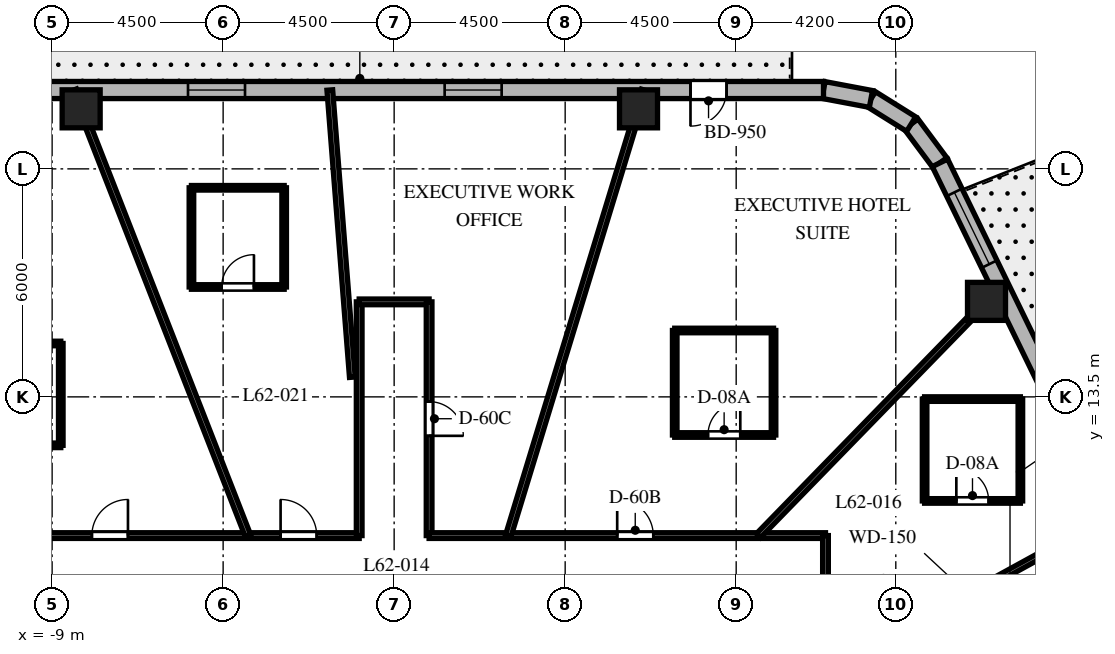
"""IFC4 building model, lengths in metres.
Left out: names, types, materials, properties, quantities, classifications, styles, units other than length and angle.
Written with IfcOpenShell. Run it as: python <this file> out.ifc"""

import sys

from ifc_helpers import new_model, si_unit, direction, frame, frame_2d, origin, origin_2d, place, context, subcontext, project, spatial, rectangle, extrude, element, fill, save


model = new_model("IFC4")
c1 = context("Model", 3, precision=1e-05, world=origin(), true_north=direction((0.0, 1.0)))
c2 = subcontext(c1, "Body", "Model", "MODEL_VIEW")
j1 = project(units=[si_unit("LENGTHUNIT", "METRE"), si_unit("PLANEANGLEUNIT", "RADIAN")], contexts=[c1])
p1 = place(None, origin())
s1 = spatial("IfcSite", under=j1, at=p1, CompositionType="ELEMENT")
p2 = place(p1, origin())
s2 = spatial("IfcBuilding", under=s1, at=p2, CompositionType="ELEMENT")
p3 = place(p2, frame((0.0, 0.0, 248.3)))
s3 = spatial("IfcBuildingStorey", under=s2, at=p3, CompositionType="ELEMENT", Elevation=248.3)
for number, where, z_axis, x_axis in (
    (1, (15.587, 16.013, 0.0), (0.0, 0.0, 1.0), (1.0, 0.0, 0.0)),
    (2, (6.43, 21.08, 0.0), (0.0, 0.0, 1.0), (1.0, 0.0, 0.0)),
    (3, (-8.236, 21.08, 0.0), (0.0, 0.0, 1.0), (1.0, 0.0, 0.0)),
):
    element("IfcColumn", number, at=place(p3, frame(where, z_axis=z_axis, x_axis=x_axis)), inside=s3, PredefinedType="COLUMN", context=c2, shape_type="SweptSolid", body=[
        extrude(rectangle(XDim=1.0, YDim=1.0, at=origin_2d()), origin(), (0.0, 0.0, 1.0), 3.8),
    ])
p4 = place(p3, frame((14.362, 19.658, 0.0), z_axis=(0.0, 0.0, 1.0), x_axis=(-0.596642462792, 0.80250717853, 0.0)))
e4 = element("IfcWall", 4, at=p4, inside=s3, PredefinedType="SOLIDWALL", context=c2, shape_type="SweptSolid", body=[
    extrude(rectangle(XDim=1.27, YDim=0.45, at=frame_2d((0.635, 0.0))), origin(), (0.0, 0.0, 1.0), 3.5),
])
p5 = place(p3, frame((13.604, 20.678, 0.0), z_axis=(0.0, 0.0, 1.0), x_axis=(-0.847910404124, 0.53013955387, 0.0)))
e5 = element("IfcWall", 5, at=p5, inside=s3, PredefinedType="SOLIDWALL", context=c2, shape_type="SweptSolid", body=[
    extrude(rectangle(XDim=1.249, YDim=0.45, at=frame_2d((0.624, 0.0))), origin(), (0.0, 0.0, 1.0), 3.5),
])
p6 = place(p3, frame((12.546, 21.34, 0.0), z_axis=(0.0, 0.0, 1.0), x_axis=(-0.982686750835, 0.18527479519, 0.0)))
e6 = element("IfcWall", 6, at=p6, inside=s3, PredefinedType="SOLIDWALL", context=c2, shape_type="SweptSolid", body=[
    extrude(rectangle(XDim=1.27, YDim=0.45, at=frame_2d((0.635, 0.0))), origin(), (0.0, 0.0, 1.0), 3.5),
])
p7 = place(p3, frame((22.74, 2.452, 0.0), z_axis=(0.0, 0.0, 1.0), x_axis=(-0.437753424814, 0.899095066755, 0.0)))
e7 = element("IfcWall", 7, at=p7, inside=s3, PredefinedType="SOLIDWALL", context=c2, shape_type="SweptSolid", body=[
    extrude(rectangle(XDim=19.137, YDim=0.45, at=frame_2d((9.569, 0.0))), origin(), (0.0, 0.0, 1.0), 3.5),
])
p8 = place(p7, frame((4.763, 0.0, 0.0)))
e8 = element("IfcOpeningElement", 8, at=p8, cuts=e7, PredefinedType="OPENING", context=c2, shape_type="SweptSolid", body=[
    extrude(rectangle(XDim=1.0, YDim=2.15, at=frame_2d((0.5, 1.075))), frame((0.0, 0.235, 0.0), z_axis=(0.0, -1.0, 0.0), x_axis=(1.0, 0.0, 0.0)), (0.0, 0.0, 1.0), 0.47),
])
p9 = place(p7, frame((6.611, 0.0, 0.8)))
e9 = element("IfcOpeningElement", 9, at=p9, cuts=e7, PredefinedType="OPENING", context=c2, shape_type="SweptSolid", body=[
    extrude(rectangle(XDim=1.2, YDim=1.8, at=frame_2d((0.6, 0.9))), frame((0.0, 0.235, 0.0), z_axis=(0.0, -1.0, 0.0), x_axis=(1.0, 0.0, 0.0)), (0.0, 0.0, 1.0), 0.47),
])
p10 = place(p7, frame((10.856, 0.0, 0.8)))
e10 = element("IfcOpeningElement", 10, at=p10, cuts=e7, PredefinedType="OPENING", context=c2, shape_type="SweptSolid", body=[
    extrude(rectangle(XDim=2.1, YDim=1.85, at=frame_2d((1.05, 0.925))), frame((0.0, 0.235, 0.0), z_axis=(0.0, -1.0, 0.0), x_axis=(1.0, 0.0, 0.0)), (0.0, 0.0, 1.0), 0.47),
])
p11 = place(p7, frame((16.173, 0.0, 0.8)))
e11 = element("IfcOpeningElement", 11, at=p11, cuts=e7, PredefinedType="OPENING", context=c2, shape_type="SweptSolid", body=[
    extrude(rectangle(XDim=2.1, YDim=1.85, at=frame_2d((1.05, 0.925))), frame((0.0, 0.235, 0.0), z_axis=(0.0, -1.0, 0.0), x_axis=(1.0, 0.0, 0.0)), (0.0, 0.0, 1.0), 0.47),
])
p12 = place(p7, frame((0.916, 0.0, 0.8)))
e12 = element("IfcOpeningElement", 12, at=p12, cuts=e7, PredefinedType="OPENING", context=c2, shape_type="SweptSolid", body=[
    extrude(rectangle(XDim=2.1, YDim=1.85, at=frame_2d((1.05, 0.925))), frame((0.0, 0.235, 0.0), z_axis=(0.0, -1.0, 0.0), x_axis=(1.0, 0.0, 0.0)), (0.0, 0.0, 1.0), 0.47),
])
p13 = place(p3, frame((11.298, 21.575, 0.0), z_axis=(0.0, 0.0, 1.0), x_axis=(-1.0, 0.0, 0.0)))
e13 = element("IfcWall", 13, at=p13, inside=s3, PredefinedType="SOLIDWALL", context=c2, shape_type="SweptSolid", body=[
    extrude(rectangle(XDim=24.399, YDim=0.45, at=frame_2d((12.2, 0.0))), origin(), (0.0, 0.0, 1.0), 3.5),
])
p14 = place(p13, frame((2.55, 0.0, 0.0)))
e14 = element("IfcOpeningElement", 14, at=p14, cuts=e13, PredefinedType="OPENING", context=c2, shape_type="SweptSolid", body=[
    extrude(rectangle(XDim=0.95, YDim=2.15, at=frame_2d((0.475, 1.075))), frame((0.0, 0.235, 0.0), z_axis=(0.0, -1.0, 0.0), x_axis=(1.0, 0.0, 0.0)), (0.0, 0.0, 1.0), 0.47),
])
p15 = place(p13, frame((8.469, 0.0, 0.8)))
e15 = element("IfcOpeningElement", 15, at=p15, cuts=e13, PredefinedType="OPENING", context=c2, shape_type="SweptSolid", body=[
    extrude(rectangle(XDim=1.5, YDim=1.8, at=frame_2d((0.75, 0.9))), frame((0.0, 0.235, 0.0), z_axis=(0.0, -1.0, 0.0), x_axis=(1.0, 0.0, 0.0)), (0.0, 0.0, 1.0), 0.47),
])
p16 = place(p13, frame((15.222, 0.0, 0.8)))
e16 = element("IfcOpeningElement", 16, at=p16, cuts=e13, PredefinedType="OPENING", context=c2, shape_type="SweptSolid", body=[
    extrude(rectangle(XDim=1.5, YDim=1.8, at=frame_2d((0.75, 0.9))), frame((0.0, 0.235, 0.0), z_axis=(0.0, -1.0, 0.0), x_axis=(1.0, 0.0, 0.0)), (0.0, 0.0, 1.0), 0.47),
])
p17 = place(p13, frame((21.296, 0.0, 0.8)))
e17 = element("IfcOpeningElement", 17, at=p17, cuts=e13, PredefinedType="OPENING", context=c2, shape_type="SweptSolid", body=[
    extrude(rectangle(XDim=1.5, YDim=1.8, at=frame_2d((0.75, 0.9))), frame((0.0, 0.235, 0.0), z_axis=(0.0, -1.0, 0.0), x_axis=(1.0, 0.0, 0.0)), (0.0, 0.0, 1.0), 0.47),
])
p18 = place(p3, frame((-11.35, 9.85, 0.0), z_axis=(0.0, 0.0, 1.0), x_axis=(1.0, 0.0, 0.0)))
e18 = element("IfcWall", 18, at=p18, inside=s3, PredefinedType="PARTITIONING", context=c2, shape_type="SweptSolid", body=[
    extrude(rectangle(XDim=10.43, YDim=0.15, at=frame_2d((5.215, 0.0))), origin(), (0.0, 0.0, 1.0), 2.99),
])
p19 = place(p18, frame((8.362, 0.0, 0.0)))
e19 = element("IfcOpeningElement", 19, at=p19, cuts=e18, PredefinedType="OPENING", context=c2, shape_type="SweptSolid", body=[
    extrude(rectangle(XDim=0.95, YDim=2.03, at=frame_2d((0.475, 1.015))), frame((0.0, 0.085, 0.0), z_axis=(0.0, -1.0, 0.0), x_axis=(1.0, 0.0, 0.0)), (0.0, 0.0, 1.0), 0.17),
])
p20 = place(p18, frame((3.396, 0.0, 0.0)))
e20 = element("IfcOpeningElement", 20, at=p20, cuts=e18, PredefinedType="OPENING", context=c2, shape_type="SweptSolid", body=[
    extrude(rectangle(XDim=0.95, YDim=2.03, at=frame_2d((0.475, 1.015))), frame((0.0, 0.085, 0.0), z_axis=(0.0, -1.0, 0.0), x_axis=(1.0, 0.0, 0.0)), (0.0, 0.0, 1.0), 0.17),
])
p21 = place(p3, frame((-0.92, 9.85, 0.0), z_axis=(0.0, 0.0, 1.0), x_axis=(0.0, 1.0, 0.0)))
e21 = element("IfcWall", 21, at=p21, inside=s3, PredefinedType="PARTITIONING", context=c2, shape_type="SweptSolid", body=[
    extrude(rectangle(XDim=6.15, YDim=0.15, at=frame_2d((3.075, 0.0))), origin(), (0.0, 0.0, 1.0), 3.026),
])
p22 = place(p3, frame((-0.92, 16.0, 0.0), z_axis=(0.0, 0.0, 1.0), x_axis=(1.0, 0.0, 0.0)))
e22 = element("IfcWall", 22, at=p22, inside=s3, PredefinedType="PARTITIONING", context=c2, shape_type="SweptSolid", body=[
    extrude(rectangle(XDim=1.84, YDim=0.15, at=frame_2d((0.92, 0.0))), origin(), (0.0, 0.0, 1.0), 3.5),
])
p23 = place(p3, frame((0.92, 16.0, 0.0), z_axis=(0.0, 0.0, 1.0), x_axis=(0.0, -1.0, 0.0)))
e23 = element("IfcWall", 23, at=p23, inside=s3, PredefinedType="PARTITIONING", context=c2, shape_type="SweptSolid", body=[
    extrude(rectangle(XDim=6.15, YDim=0.15, at=frame_2d((3.075, 0.0))), origin(), (0.0, 0.0, 1.0), 3.026),
])
p24 = place(p23, frame((2.625, 0.0, 0.0)))
e24 = element("IfcOpeningElement", 24, at=p24, cuts=e23, PredefinedType="OPENING", context=c2, shape_type="SweptSolid", body=[
    extrude(rectangle(XDim=0.9, YDim=2.03, at=frame_2d((0.45, 1.015))), frame((0.0, 0.085, 0.0), z_axis=(0.0, -1.0, 0.0), x_axis=(1.0, 0.0, 0.0)), (0.0, 0.0, 1.0), 0.17),
])
p25 = place(p3, frame((0.92, 9.85, 0.0), z_axis=(0.0, 0.0, 1.0), x_axis=(1.0, 0.0, 0.0)))
e25 = element("IfcWall", 25, at=p25, inside=s3, PredefinedType="PARTITIONING", context=c2, shape_type="SweptSolid", body=[
    extrude(rectangle(XDim=10.43, YDim=0.15, at=frame_2d((5.215, 0.0))), origin(), (0.0, 0.0, 1.0), 2.99),
])
p26 = place(p25, frame((4.949, 0.0, 0.0)))
e26 = element("IfcOpeningElement", 26, at=p26, cuts=e25, PredefinedType="OPENING", context=c2, shape_type="SweptSolid", body=[
    extrude(rectangle(XDim=0.95, YDim=2.03, at=frame_2d((0.475, 1.015))), frame((0.0, 0.085, 0.0), z_axis=(0.0, -1.0, 0.0), x_axis=(1.0, 0.0, 0.0)), (0.0, 0.0, 1.0), 0.17),
])
p27 = place(p3, frame((11.35, 9.85, 0.0), z_axis=(0.0, 0.0, 1.0), x_axis=(0.0, -1.0, 0.0)))
e27 = element("IfcWall", 27, at=p27, inside=s3, PredefinedType="PARTITIONING", context=c2, shape_type="SweptSolid", body=[
    extrude(rectangle(XDim=12.4, YDim=0.15, at=frame_2d((6.2, 0.0))), origin(), (0.0, 0.0, 1.0), 2.99),
])
p28 = place(p27, frame((4.709, 0.0, 0.0)))
e28 = element("IfcOpeningElement", 28, at=p28, cuts=e27, PredefinedType="OPENING", context=c2, shape_type="SweptSolid", body=[
    extrude(rectangle(XDim=0.9, YDim=2.03, at=frame_2d((0.45, 1.015))), frame((0.0, 0.085, 0.0), z_axis=(0.0, -1.0, 0.0), x_axis=(1.0, 0.0, 0.0)), (0.0, 0.0, 1.0), 0.17),
])
p29 = place(p27, frame((1.457, 0.0, 0.0)))
e29 = element("IfcOpeningElement", 29, at=p29, cuts=e27, PredefinedType="OPENING", context=c2, shape_type="SweptSolid", body=[
    extrude(rectangle(XDim=0.95, YDim=2.03, at=frame_2d((0.475, 1.015))), frame((0.0, 0.085, 0.0), z_axis=(0.0, -1.0, 0.0), x_axis=(1.0, 0.0, 0.0)), (0.0, 0.0, 1.0), 0.17),
])
p30 = place(p27, frame((8.835, 0.0, 0.0)))
e30 = element("IfcOpeningElement", 30, at=p30, cuts=e27, PredefinedType="OPENING", context=c2, shape_type="SweptSolid", body=[
    extrude(rectangle(XDim=0.95, YDim=2.03, at=frame_2d((0.475, 1.015))), frame((0.0, 0.085, 0.0), z_axis=(0.0, -1.0, 0.0), x_axis=(1.0, 0.0, 0.0)), (0.0, 0.0, 1.0), 0.17),
])
p31 = place(p3, frame((11.35, 6.227, 0.0), z_axis=(0.0, 0.0, 1.0), x_axis=(0.876723190824, 0.480995266786, 0.0)))
e31 = element("IfcWall", 31, at=p31, inside=s3, PredefinedType="PARTITIONING", context=c2, shape_type="SweptSolid", body=[
    extrude(rectangle(XDim=8.598, YDim=0.15, at=frame_2d((4.299, 0.0))), origin(), (0.0, 0.0, 1.0), 2.74),
])
p32 = place(p3, frame((9.588, 9.85, 0.0), z_axis=(0.0, 0.0, 1.0), x_axis=(0.697519469595, 0.716565830567, 0.0)))
e32 = element("IfcWall", 32, at=p32, inside=s3, PredefinedType="PARTITIONING", context=c2, shape_type="SweptSolid", body=[
    extrude(rectangle(XDim=9.126, YDim=0.15, at=frame_2d((4.563, 0.0))), origin(), (0.0, 0.0, 1.0), 2.74),
])
p33 = place(p3, frame((3.004, 9.85, 0.0), z_axis=(0.0, 0.0, 1.0), x_axis=(0.291775760688, 0.956486751333, 0.0)))
e33 = element("IfcWall", 33, at=p33, inside=s3, PredefinedType="PARTITIONING", context=c2, shape_type="SweptSolid", body=[
    extrude(rectangle(XDim=12.258, YDim=0.15, at=frame_2d((6.129, 0.0))), origin(), (0.0, 0.0, 1.0), 2.74),
])
p34 = place(p3, frame((-1.1, 14.018, 0.0), z_axis=(0.0, 0.0, 1.0), x_axis=(-0.078228275349, 0.996935472804, 0.0)))
e34 = element("IfcWall", 34, at=p34, inside=s3, PredefinedType="PARTITIONING", context=c2, shape_type="SweptSolid", body=[
    extrude(rectangle(XDim=7.581, YDim=0.15, at=frame_2d((3.79, 0.0))), origin(), (0.0, 0.0, 1.0), 2.74),
])
p35 = place(p3, frame((-3.848, 9.85, 0.0), z_axis=(0.0, 0.0, 1.0), x_axis=(-0.363921778212, 0.931429513889, 0.0)))
e35 = element("IfcWall", 35, at=p35, inside=s3, PredefinedType="PARTITIONING", context=c2, shape_type="SweptSolid", body=[
    extrude(rectangle(XDim=12.588, YDim=0.15, at=frame_2d((6.294, 0.0))), origin(), (0.0, 0.0, 1.0), 2.74),
])
p36 = place(p3, frame((13.958, 10.762, 0.0), z_axis=(0.0, 0.0, 1.0), x_axis=(1.0, 0.0, 0.0)))
e36 = element("IfcWall", 36, at=p36, inside=s3, PredefinedType="PARTITIONING", context=c2, shape_type="SweptSolid", body=[
    extrude(rectangle(XDim=2.52, YDim=0.12, at=frame_2d((1.26, 0.0))), origin(), (0.0, 0.0, 1.0), 3.026),
])
p37 = place(p36, frame((0.835, 0.0, 0.0)))
e37 = element("IfcOpeningElement", 37, at=p37, cuts=e36, PredefinedType="OPENING", context=c2, shape_type="SweptSolid", body=[
    extrude(rectangle(XDim=0.85, YDim=2.03, at=frame_2d((0.425, 1.015))), frame((0.0, 0.07, 0.0), z_axis=(0.0, -1.0, 0.0), x_axis=(1.0, 0.0, 0.0)), (0.0, 0.0, 1.0), 0.14),
])
p38 = place(p3, frame((16.478, 10.762, 0.0), z_axis=(0.0, 0.0, 1.0), x_axis=(0.0, 1.0, 0.0)))
e38 = element("IfcWall", 38, at=p38, inside=s3, PredefinedType="PARTITIONING", context=c2, shape_type="SweptSolid", body=[
    extrude(rectangle(XDim=2.68, YDim=0.12, at=frame_2d((1.34, 0.0))), origin(), (0.0, 0.0, 1.0), 3.5),
])
p39 = place(p3, frame((16.478, 13.442, 0.0), z_axis=(0.0, 0.0, 1.0), x_axis=(-1.0, 0.0, 0.0)))
e39 = element("IfcWall", 39, at=p39, inside=s3, PredefinedType="PARTITIONING", context=c2, shape_type="SweptSolid", body=[
    extrude(rectangle(XDim=2.52, YDim=0.12, at=frame_2d((1.26, 0.0))), origin(), (0.0, 0.0, 1.0), 3.5),
])
p40 = place(p3, frame((13.958, 13.442, 0.0), z_axis=(0.0, 0.0, 1.0), x_axis=(0.0, -1.0, 0.0)))
e40 = element("IfcWall", 40, at=p40, inside=s3, PredefinedType="PARTITIONING", context=c2, shape_type="SweptSolid", body=[
    extrude(rectangle(XDim=2.68, YDim=0.12, at=frame_2d((1.34, 0.0))), origin(), (0.0, 0.0, 1.0), 3.026),
])
p41 = place(p3, frame((7.383, 12.497, 0.0), z_axis=(0.0, 0.0, 1.0), x_axis=(1.0, 0.0, 0.0)))
e41 = element("IfcWall", 41, at=p41, inside=s3, PredefinedType="PARTITIONING", context=c2, shape_type="SweptSolid", body=[
    extrude(rectangle(XDim=2.6, YDim=0.12, at=frame_2d((1.3, 0.0))), origin(), (0.0, 0.0, 1.0), 2.94),
])
p42 = place(p41, frame((0.875, 0.0, 0.0)))
e42 = element("IfcOpeningElement", 42, at=p42, cuts=e41, PredefinedType="OPENING", context=c2, shape_type="SweptSolid", body=[
    extrude(rectangle(XDim=0.85, YDim=2.03, at=frame_2d((0.425, 1.015))), frame((0.0, 0.07, 0.0), z_axis=(0.0, -1.0, 0.0), x_axis=(1.0, 0.0, 0.0)), (0.0, 0.0, 1.0), 0.14),
])
p43 = place(p3, frame((9.983, 12.497, 0.0), z_axis=(0.0, 0.0, 1.0), x_axis=(0.0, 1.0, 0.0)))
e43 = element("IfcWall", 43, at=p43, inside=s3, PredefinedType="PARTITIONING", context=c2, shape_type="SweptSolid", body=[
    extrude(rectangle(XDim=2.75, YDim=0.12, at=frame_2d((1.375, 0.0))), origin(), (0.0, 0.0, 1.0), 3.072),
])
p44 = place(p3, frame((9.983, 15.247, 0.0), z_axis=(0.0, 0.0, 1.0), x_axis=(-1.0, 0.0, 0.0)))
e44 = element("IfcWall", 44, at=p44, inside=s3, PredefinedType="PARTITIONING", context=c2, shape_type="SweptSolid", body=[
    extrude(rectangle(XDim=2.6, YDim=0.12, at=frame_2d((1.3, 0.0))), origin(), (0.0, 0.0, 1.0), 3.072),
])
p45 = place(p3, frame((7.383, 15.247, 0.0), z_axis=(0.0, 0.0, 1.0), x_axis=(0.0, -1.0, 0.0)))
e45 = element("IfcWall", 45, at=p45, inside=s3, PredefinedType="PARTITIONING", context=c2, shape_type="SweptSolid", body=[
    extrude(rectangle(XDim=2.75, YDim=0.12, at=frame_2d((1.375, 0.0))), origin(), (0.0, 0.0, 1.0), 2.94),
])
p46 = place(p3, frame((-5.334, 16.392, 0.0), z_axis=(0.0, 0.0, 1.0), x_axis=(1.0, 0.0, 0.0)))
e46 = element("IfcWall", 46, at=p46, inside=s3, PredefinedType="PARTITIONING", context=c2, shape_type="SweptSolid", body=[
    extrude(rectangle(XDim=2.44, YDim=0.12, at=frame_2d((1.22, 0.0))), origin(), (0.0, 0.0, 1.0), 3.5),
])
p47 = place(p46, frame((0.795, 0.0, 0.0)))
e47 = element("IfcOpeningElement", 47, at=p47, cuts=e46, PredefinedType="OPENING", context=c2, shape_type="SweptSolid", body=[
    extrude(rectangle(XDim=0.85, YDim=2.03, at=frame_2d((0.425, 1.015))), frame((0.0, 0.07, 0.0), z_axis=(0.0, -1.0, 0.0), x_axis=(1.0, 0.0, 0.0)), (0.0, 0.0, 1.0), 0.14),
])
p48 = place(p3, frame((-2.894, 16.392, 0.0), z_axis=(0.0, 0.0, 1.0), x_axis=(0.0, 1.0, 0.0)))
e48 = element("IfcWall", 48, at=p48, inside=s3, PredefinedType="PARTITIONING", context=c2, shape_type="SweptSolid", body=[
    extrude(rectangle(XDim=2.61, YDim=0.12, at=frame_2d((1.305, 0.0))), origin(), (0.0, 0.0, 1.0), 2.94),
])
p49 = place(p3, frame((-2.894, 19.002, 0.0), z_axis=(0.0, 0.0, 1.0), x_axis=(-1.0, 0.0, 0.0)))
e49 = element("IfcWall", 49, at=p49, inside=s3, PredefinedType="PARTITIONING", context=c2, shape_type="SweptSolid", body=[
    extrude(rectangle(XDim=2.44, YDim=0.12, at=frame_2d((1.22, 0.0))), origin(), (0.0, 0.0, 1.0), 3.5),
])
p50 = place(p3, frame((-5.334, 19.002, 0.0), z_axis=(0.0, 0.0, 1.0), x_axis=(0.0, -1.0, 0.0)))
e50 = element("IfcWall", 50, at=p50, inside=s3, PredefinedType="PARTITIONING", context=c2, shape_type="SweptSolid", body=[
    extrude(rectangle(XDim=2.61, YDim=0.12, at=frame_2d((1.305, 0.0))), origin(), (0.0, 0.0, 1.0), 2.94),
])
p51 = place(p3, frame((-11.292, 12.225, 0.0), z_axis=(0.0, 0.0, 1.0), x_axis=(1.0, 0.0, 0.0)))
e51 = element("IfcWall", 51, at=p51, inside=s3, PredefinedType="PARTITIONING", context=c2, shape_type="SweptSolid", body=[
    extrude(rectangle(XDim=2.52, YDim=0.12, at=frame_2d((1.26, 0.0))), origin(), (0.0, 0.0, 1.0), 2.99),
])
p52 = place(p51, frame((0.835, 0.0, 0.0)))
e52 = element("IfcOpeningElement", 52, at=p52, cuts=e51, PredefinedType="OPENING", context=c2, shape_type="SweptSolid", body=[
    extrude(rectangle(XDim=0.85, YDim=2.03, at=frame_2d((0.425, 1.015))), frame((0.0, 0.07, 0.0), z_axis=(0.0, -1.0, 0.0), x_axis=(1.0, 0.0, 0.0)), (0.0, 0.0, 1.0), 0.14),
])
p53 = place(p3, frame((-8.772, 12.225, 0.0), z_axis=(0.0, 0.0, 1.0), x_axis=(0.0, 1.0, 0.0)))
e53 = element("IfcWall", 53, at=p53, inside=s3, PredefinedType="PARTITIONING", context=c2, shape_type="SweptSolid", body=[
    extrude(rectangle(XDim=2.68, YDim=0.12, at=frame_2d((1.34, 0.0))), origin(), (0.0, 0.0, 1.0), 2.99),
])
p54 = place(p3, frame((-8.772, 14.905, 0.0), z_axis=(0.0, 0.0, 1.0), x_axis=(-1.0, 0.0, 0.0)))
e54 = element("IfcWall", 54, at=p54, inside=s3, PredefinedType="PARTITIONING", context=c2, shape_type="SweptSolid", body=[
    extrude(rectangle(XDim=2.52, YDim=0.12, at=frame_2d((1.26, 0.0))), origin(), (0.0, 0.0, 1.0), 3.026),
])
p55 = place(p11, origin())
e55 = element("IfcWindow", 55, at=p55, inside=s3, PartitioningType="SINGLE_PANEL", PredefinedType="WINDOW", context=c2, shape_type="SweptSolid", body=[
    extrude(rectangle(XDim=2.1, YDim=1.85, at=frame_2d((1.05, 0.925))), frame((0.0, 0.03, 0.0), z_axis=(0.0, -1.0, 0.0), x_axis=(1.0, 0.0, 0.0)), (0.0, 0.0, 1.0), 0.06),
])
fill(e11, e55)
p56 = place(p14, origin())
e56 = element("IfcDoor", 56, at=p56, inside=s3, OperationType="SINGLE_SWING_RIGHT", PredefinedType="DOOR", context=c2, shape_type="SweptSolid", body=[
    extrude(rectangle(XDim=0.95, YDim=2.15, at=frame_2d((0.475, 1.075))), frame((0.0, 0.025, 0.0), z_axis=(0.0, -1.0, 0.0), x_axis=(1.0, 0.0, 0.0)), (0.0, 0.0, 1.0), 0.05),
])
fill(e14, e56)
p57 = place(p15, origin())
e57 = element("IfcWindow", 57, at=p57, inside=s3, PartitioningType="SINGLE_PANEL", PredefinedType="WINDOW", context=c2, shape_type="SweptSolid", body=[
    extrude(rectangle(XDim=1.5, YDim=1.8, at=frame_2d((0.75, 0.9))), frame((0.0, 0.03, 0.0), z_axis=(0.0, -1.0, 0.0), x_axis=(1.0, 0.0, 0.0)), (0.0, 0.0, 1.0), 0.06),
])
fill(e15, e57)
p58 = place(p16, origin())
e58 = element("IfcWindow", 58, at=p58, inside=s3, PartitioningType="SINGLE_PANEL", PredefinedType="WINDOW", context=c2, shape_type="SweptSolid", body=[
    extrude(rectangle(XDim=1.5, YDim=1.8, at=frame_2d((0.75, 0.9))), frame((0.0, 0.03, 0.0), z_axis=(0.0, -1.0, 0.0), x_axis=(1.0, 0.0, 0.0)), (0.0, 0.0, 1.0), 0.06),
])
fill(e16, e58)
p59 = place(p37, origin())
e59 = element("IfcDoor", 59, at=p59, inside=s3, OperationType="SINGLE_SWING_LEFT", PredefinedType="DOOR", context=c2, shape_type="SweptSolid", body=[
    extrude(rectangle(XDim=0.85, YDim=2.03, at=frame_2d((0.425, 1.015))), frame((0.0, 0.025, 0.0), z_axis=(0.0, -1.0, 0.0), x_axis=(1.0, 0.0, 0.0)), (0.0, 0.0, 1.0), 0.05),
])
fill(e37, e59)
p60 = place(p26, origin())
e60 = element("IfcDoor", 60, at=p60, inside=s3, OperationType="SINGLE_SWING_LEFT", PredefinedType="DOOR", context=c2, shape_type="SweptSolid", body=[
    extrude(rectangle(XDim=0.95, YDim=2.03, at=frame_2d((0.475, 1.015))), frame((0.0, 0.025, 0.0), z_axis=(0.0, -1.0, 0.0), x_axis=(1.0, 0.0, 0.0)), (0.0, 0.0, 1.0), 0.05),
])
fill(e26, e60)
p61 = place(p42, origin())
e61 = element("IfcDoor", 61, at=p61, inside=s3, OperationType="SINGLE_SWING_RIGHT", PredefinedType="DOOR", context=c2, shape_type="SweptSolid", body=[
    extrude(rectangle(XDim=0.85, YDim=2.03, at=frame_2d((0.425, 1.015))), frame((0.0, 0.025, 0.0), z_axis=(0.0, -1.0, 0.0), x_axis=(1.0, 0.0, 0.0)), (0.0, 0.0, 1.0), 0.05),
])
fill(e42, e61)
p62 = place(p24, origin())
e62 = element("IfcDoor", 62, at=p62, inside=s3, OperationType="SINGLE_SWING_RIGHT", PredefinedType="DOOR", context=c2, shape_type="SweptSolid", body=[
    extrude(rectangle(XDim=0.9, YDim=2.03, at=frame_2d((0.45, 1.015))), frame((0.0, 0.025, 0.0), z_axis=(0.0, -1.0, 0.0), x_axis=(1.0, 0.0, 0.0)), (0.0, 0.0, 1.0), 0.05),
])
fill(e24, e62)
p63 = place(p19, origin())
e63 = element("IfcDoor", 63, at=p63, inside=s3, OperationType="SINGLE_SWING_LEFT", PredefinedType="DOOR", context=c2, shape_type="SweptSolid", body=[
    extrude(rectangle(XDim=0.95, YDim=2.03, at=frame_2d((0.475, 1.015))), frame((0.0, 0.025, 0.0), z_axis=(0.0, -1.0, 0.0), x_axis=(1.0, 0.0, 0.0)), (0.0, 0.0, 1.0), 0.05),
])
fill(e19, e63)
p64 = place(p47, origin())
e64 = element("IfcDoor", 64, at=p64, inside=s3, OperationType="SINGLE_SWING_RIGHT", PredefinedType="DOOR", context=c2, shape_type="SweptSolid", body=[
    extrude(rectangle(XDim=0.85, YDim=2.03, at=frame_2d((0.425, 1.015))), frame((0.0, 0.025, 0.0), z_axis=(0.0, -1.0, 0.0), x_axis=(1.0, 0.0, 0.0)), (0.0, 0.0, 1.0), 0.05),
])
fill(e47, e64)
p65 = place(p20, origin())
e65 = element("IfcDoor", 65, at=p65, inside=s3, OperationType="SINGLE_SWING_RIGHT", PredefinedType="DOOR", context=c2, shape_type="SweptSolid", body=[
    extrude(rectangle(XDim=0.95, YDim=2.03, at=frame_2d((0.475, 1.015))), frame((0.0, 0.025, 0.0), z_axis=(0.0, -1.0, 0.0), x_axis=(1.0, 0.0, 0.0)), (0.0, 0.0, 1.0), 0.05),
])
fill(e20, e65)
save(model, sys.argv[1])
